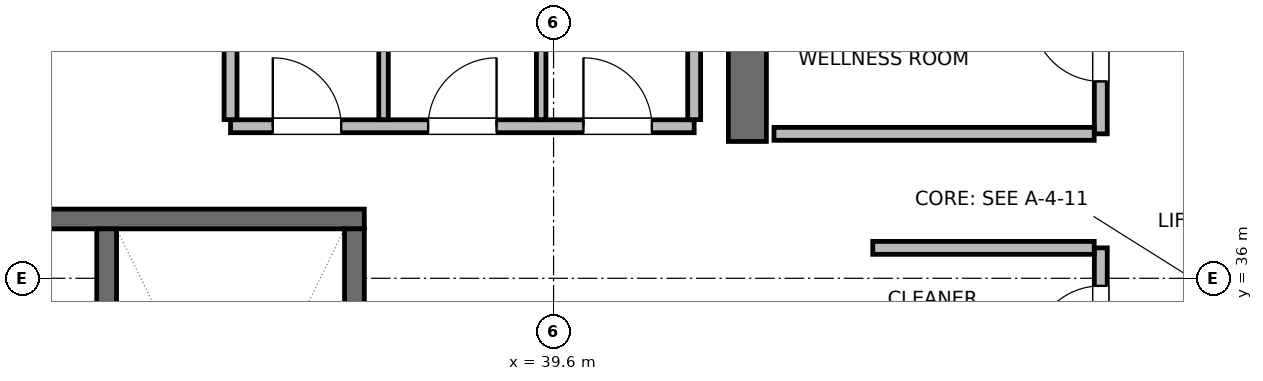
"""IFC4 building model, lengths in metres.
Left out: names, types, materials, properties, quantities, classifications, styles, units other than length and angle.
Written with IfcOpenShell. Run it as: python <this file> out.ifc"""

import sys

from ifc_helpers import new_model, si_unit, direction, frame, frame_2d, origin, place, context, subcontext, project, spatial, rectangle, extrude, element, fill, save


model = new_model("IFC4")
c1 = context("Model", 3, precision=1e-05, world=origin(), true_north=direction((0.0, 1.0)))
c2 = subcontext(c1, "Body", "Model", "MODEL_VIEW")
j1 = project(units=[si_unit("LENGTHUNIT", "METRE"), si_unit("PLANEANGLEUNIT", "RADIAN")], contexts=[c1])
p1 = place(None, origin())
s1 = spatial("IfcSite", under=j1, at=p1, CompositionType="ELEMENT")
p2 = place(p1, origin())
s2 = spatial("IfcBuilding", under=s1, at=p2, CompositionType="ELEMENT")
p3 = place(p2, frame((0.0, 0.0, 302.4)))
s3 = spatial("IfcBuildingStorey", under=s2, at=p3, CompositionType="ELEMENT", Elevation=302.4)
p4 = place(p3, frame((42.15, 37.8, 0.0), z_axis=(0.0, 0.0, 1.0), x_axis=(0.0, 1.0, 0.0)))
e1 = element("IfcWall", 1, at=p4, inside=s3, PredefinedType="SHEAR", context=c2, shape_type="SweptSolid", body=[
    extrude(rectangle(XDim=6.35, YDim=0.5, at=frame_2d((3.175, 0.0))), origin(), (0.0, 0.0, 1.0), 3.9),
])
p5 = place(p3, frame((32.9, 36.78, 0.0), z_axis=(0.0, 0.0, 1.0), x_axis=(1.0, 0.0, 0.0)))
e2 = element("IfcWall", 2, at=p5, inside=s3, PredefinedType="SHEAR", context=c2, shape_type="SweptSolid", body=[
    extrude(rectangle(XDim=4.21, YDim=0.26, at=frame_2d((2.105, 0.0))), origin(), (0.0, 0.0, 1.0), 3.9),
])
p6 = place(p3, frame((33.72, 29.05, 0.0), z_axis=(0.0, 0.0, 1.0), x_axis=(0.0, 1.0, 0.0)))
e3 = element("IfcWall", 3, at=p6, inside=s3, PredefinedType="SHEAR", context=c2, shape_type="SweptSolid", body=[
    extrude(rectangle(XDim=7.6, YDim=0.26, at=frame_2d((3.8, 0.0))), origin(), (0.0, 0.0, 1.0), 3.9),
])
p7 = place(p3, frame((36.98, 29.05, 0.0), z_axis=(0.0, 0.0, 1.0), x_axis=(0.0, 1.0, 0.0)))
e4 = element("IfcWall", 4, at=p7, inside=s3, PredefinedType="SHEAR", context=c2, shape_type="SweptSolid", body=[
    extrude(rectangle(XDim=7.6, YDim=0.26, at=frame_2d((3.8, 0.0))), origin(), (0.0, 0.0, 1.0), 3.9),
])
p8 = place(p7, frame((0.3, 0.0, 0.0)))
e5 = element("IfcOpeningElement", 5, at=p8, cuts=e4, PredefinedType="OPENING", context=c2, shape_type="SweptSolid", body=[
    extrude(rectangle(XDim=1.0, YDim=2.04, at=frame_2d((0.5, 1.02))), frame((0.0, 0.14, 0.0), z_axis=(0.0, -1.0, 0.0), x_axis=(1.0, 0.0, 0.0)), (0.0, 0.0, 1.0), 0.28),
])
p9 = place(p3, frame((35.35, 38.0, 0.0), z_axis=(0.0, 0.0, 1.0), x_axis=(1.0, 0.0, 0.0)))
e6 = element("IfcWall", 6, at=p9, inside=s3, PredefinedType="PARTITIONING", context=c2, shape_type="SweptSolid", body=[
    extrude(rectangle(XDim=6.1, YDim=0.17, at=frame_2d((3.05, 0.0))), origin(), (0.0, 0.0, 1.0), 3.68),
])
p10 = place(p9, frame((0.556, 0.0, 0.0)))
e7 = element("IfcOpeningElement", 7, at=p10, cuts=e6, PredefinedType="OPENING", context=c2, shape_type="SweptSolid", body=[
    extrude(rectangle(XDim=0.9, YDim=2.02, at=frame_2d((0.45, 1.01))), frame((0.0, 0.095, 0.0), z_axis=(0.0, -1.0, 0.0), x_axis=(1.0, 0.0, 0.0)), (0.0, 0.0, 1.0), 0.19),
])
p11 = place(p9, frame((2.6, 0.0, 0.0)))
e8 = element("IfcOpeningElement", 8, at=p11, cuts=e6, PredefinedType="OPENING", context=c2, shape_type="SweptSolid", body=[
    extrude(rectangle(XDim=0.9, YDim=2.02, at=frame_2d((0.45, 1.01))), frame((0.0, 0.095, 0.0), z_axis=(0.0, -1.0, 0.0), x_axis=(1.0, 0.0, 0.0)), (0.0, 0.0, 1.0), 0.19),
])
p12 = place(p9, frame((4.643, 0.0, 0.0)))
e9 = element("IfcOpeningElement", 9, at=p12, cuts=e6, PredefinedType="OPENING", context=c2, shape_type="SweptSolid", body=[
    extrude(rectangle(XDim=0.9, YDim=2.02, at=frame_2d((0.45, 1.01))), frame((0.0, 0.095, 0.0), z_axis=(0.0, -1.0, 0.0), x_axis=(1.0, 0.0, 0.0)), (0.0, 0.0, 1.0), 0.19),
])
p13 = place(p3, frame((35.35, 38.087, 0.0), z_axis=(0.0, 0.0, 1.0), x_axis=(0.0, 1.0, 0.0)))
e10 = element("IfcWall", 10, at=p13, inside=s3, PredefinedType="PARTITIONING", context=c2, shape_type="SweptSolid", body=[
    extrude(rectangle(XDim=1.493, YDim=0.17, at=frame_2d((0.747, 0.0))), origin(), (0.0, 0.0, 1.0), 3.68),
])
p14 = place(p3, frame((41.45, 38.087, 0.0), z_axis=(0.0, 0.0, 1.0), x_axis=(0.0, 1.0, 0.0)))
e11 = element("IfcWall", 11, at=p14, inside=s3, PredefinedType="PARTITIONING", context=c2, shape_type="SweptSolid", body=[
    extrude(rectangle(XDim=2.813, YDim=0.17, at=frame_2d((1.406, 0.0))), origin(), (0.0, 0.0, 1.0), 3.68),
])
for number, where, z_axis, x_axis in (
    (12, (37.363, 38.087, 0.0), (0.0, 0.0, 1.0), (0.0, 1.0, 0.0)),
    (13, (39.437, 38.087, 0.0), (0.0, 0.0, 1.0), (0.0, 1.0, 0.0)),
):
    element("IfcWall", number, at=place(p3, frame(where, z_axis=z_axis, x_axis=x_axis)), inside=s3, PredefinedType="PARTITIONING", context=c2, shape_type="SweptSolid", body=[
        extrude(rectangle(XDim=2.813, YDim=0.125, at=frame_2d((1.406, 0.0))), origin(), (0.0, 0.0, 1.0), 3.68),
    ])
p15 = place(p3, frame((46.8, 32.6, 0.0), z_axis=(0.0, 0.0, 1.0), x_axis=(0.0, 1.0, 0.0)))
e14 = element("IfcWall", 14, at=p15, inside=s3, PredefinedType="PARTITIONING", context=c2, shape_type="SweptSolid", body=[
    extrude(rectangle(XDim=3.8, YDim=0.17, at=frame_2d((1.9, 0.0))), origin(), (0.0, 0.0, 1.0), 3.68),
])
p16 = place(p15, frame((0.5, 0.0, 0.0)))
e15 = element("IfcOpeningElement", 15, at=p16, cuts=e14, PredefinedType="OPENING", context=c2, shape_type="SweptSolid", body=[
    extrude(rectangle(XDim=0.9, YDim=2.02, at=frame_2d((0.45, 1.01))), frame((0.0, 0.095, 0.0), z_axis=(0.0, -1.0, 0.0), x_axis=(1.0, 0.0, 0.0)), (0.0, 0.0, 1.0), 0.19),
])
p17 = place(p15, frame((2.4, 0.0, 0.0)))
e16 = element("IfcOpeningElement", 16, at=p17, cuts=e14, PredefinedType="OPENING", context=c2, shape_type="SweptSolid", body=[
    extrude(rectangle(XDim=0.9, YDim=2.02, at=frame_2d((0.45, 1.01))), frame((0.0, 0.095, 0.0), z_axis=(0.0, -1.0, 0.0), x_axis=(1.0, 0.0, 0.0)), (0.0, 0.0, 1.0), 0.19),
])
p18 = place(p3, frame((43.8, 36.4, 0.0), z_axis=(0.0, 0.0, 1.0), x_axis=(1.0, 0.0, 0.0)))
e17 = element("IfcWall", 17, at=p18, inside=s3, PredefinedType="PARTITIONING", context=c2, shape_type="SweptSolid", body=[
    extrude(rectangle(XDim=2.913, YDim=0.17, at=frame_2d((1.457, 0.0))), origin(), (0.0, 0.0, 1.0), 3.68),
])
p19 = place(p3, frame((46.8, 37.9, 0.0), z_axis=(0.0, 0.0, 1.0), x_axis=(0.0, 1.0, 0.0)))
e18 = element("IfcWall", 18, at=p19, inside=s3, PredefinedType="PARTITIONING", context=c2, shape_type="SweptSolid", body=[
    extrude(rectangle(XDim=6.0, YDim=0.17, at=frame_2d((3.0, 0.0))), origin(), (0.0, 0.0, 1.0), 3.68),
])
p20 = place(p19, frame((0.69, 0.0, 0.0)))
e19 = element("IfcOpeningElement", 19, at=p20, cuts=e18, PredefinedType="OPENING", context=c2, shape_type="SweptSolid", body=[
    extrude(rectangle(XDim=0.9, YDim=2.02, at=frame_2d((0.45, 1.01))), frame((0.0, 0.095, 0.0), z_axis=(0.0, -1.0, 0.0), x_axis=(1.0, 0.0, 0.0)), (0.0, 0.0, 1.0), 0.19),
])
p21 = place(p19, frame((3.69, 0.0, 0.0)))
e20 = element("IfcOpeningElement", 20, at=p21, cuts=e18, PredefinedType="OPENING", context=c2, shape_type="SweptSolid", body=[
    extrude(rectangle(XDim=0.9, YDim=2.02, at=frame_2d((0.45, 1.01))), frame((0.0, 0.095, 0.0), z_axis=(0.0, -1.0, 0.0), x_axis=(1.0, 0.0, 0.0)), (0.0, 0.0, 1.0), 0.19),
])
p22 = place(p3, frame((42.5, 37.9, 0.0), z_axis=(0.0, 0.0, 1.0), x_axis=(1.0, 0.0, 0.0)))
e21 = element("IfcWall", 21, at=p22, inside=s3, PredefinedType="PARTITIONING", context=c2, shape_type="SweptSolid", body=[
    extrude(rectangle(XDim=4.213, YDim=0.17, at=frame_2d((2.106, 0.0))), origin(), (0.0, 0.0, 1.0), 3.68),
])
p23 = place(p10, origin())
e22 = element("IfcDoor", 22, at=p23, inside=s3, OperationType="SINGLE_SWING_LEFT", PredefinedType="DOOR", context=c2, shape_type="SweptSolid", body=[
    extrude(rectangle(XDim=0.9, YDim=2.02, at=frame_2d((0.45, 1.01))), frame((0.0, 0.025, 0.0), z_axis=(0.0, -1.0, 0.0), x_axis=(1.0, 0.0, 0.0)), (0.0, 0.0, 1.0), 0.05),
])
fill(e7, e22)
p24 = place(p11, origin())
e23 = element("IfcDoor", 23, at=p24, inside=s3, OperationType="SINGLE_SWING_RIGHT", PredefinedType="DOOR", context=c2, shape_type="SweptSolid", body=[
    extrude(rectangle(XDim=0.9, YDim=2.02, at=frame_2d((0.45, 1.01))), frame((0.0, 0.025, 0.0), z_axis=(0.0, -1.0, 0.0), x_axis=(1.0, 0.0, 0.0)), (0.0, 0.0, 1.0), 0.05),
])
fill(e8, e23)
p25 = place(p12, origin())
e24 = element("IfcDoor", 24, at=p25, inside=s3, OperationType="SINGLE_SWING_LEFT", PredefinedType="DOOR", context=c2, shape_type="SweptSolid", body=[
    extrude(rectangle(XDim=0.9, YDim=2.02, at=frame_2d((0.45, 1.01))), frame((0.0, 0.025, 0.0), z_axis=(0.0, -1.0, 0.0), x_axis=(1.0, 0.0, 0.0)), (0.0, 0.0, 1.0), 0.05),
])
fill(e9, e24)
p26 = place(p17, origin())
e25 = element("IfcDoor", 25, at=p26, inside=s3, OperationType="SINGLE_SWING_LEFT", PredefinedType="DOOR", context=c2, shape_type="SweptSolid", body=[
    extrude(rectangle(XDim=0.9, YDim=2.02, at=frame_2d((0.45, 1.01))), frame((0.0, 0.025, 0.0), z_axis=(0.0, -1.0, 0.0), x_axis=(1.0, 0.0, 0.0)), (0.0, 0.0, 1.0), 0.05),
])
fill(e16, e25)
p27 = place(p20, origin())
e26 = element("IfcDoor", 26, at=p27, inside=s3, OperationType="SINGLE_SWING_RIGHT", PredefinedType="DOOR", context=c2, shape_type="SweptSolid", body=[
    extrude(rectangle(XDim=0.9, YDim=2.02, at=frame_2d((0.45, 1.01))), frame((0.0, 0.025, 0.0), z_axis=(0.0, -1.0, 0.0), x_axis=(1.0, 0.0, 0.0)), (0.0, 0.0, 1.0), 0.05),
])
fill(e19, e26)
save(model, sys.argv[1])
